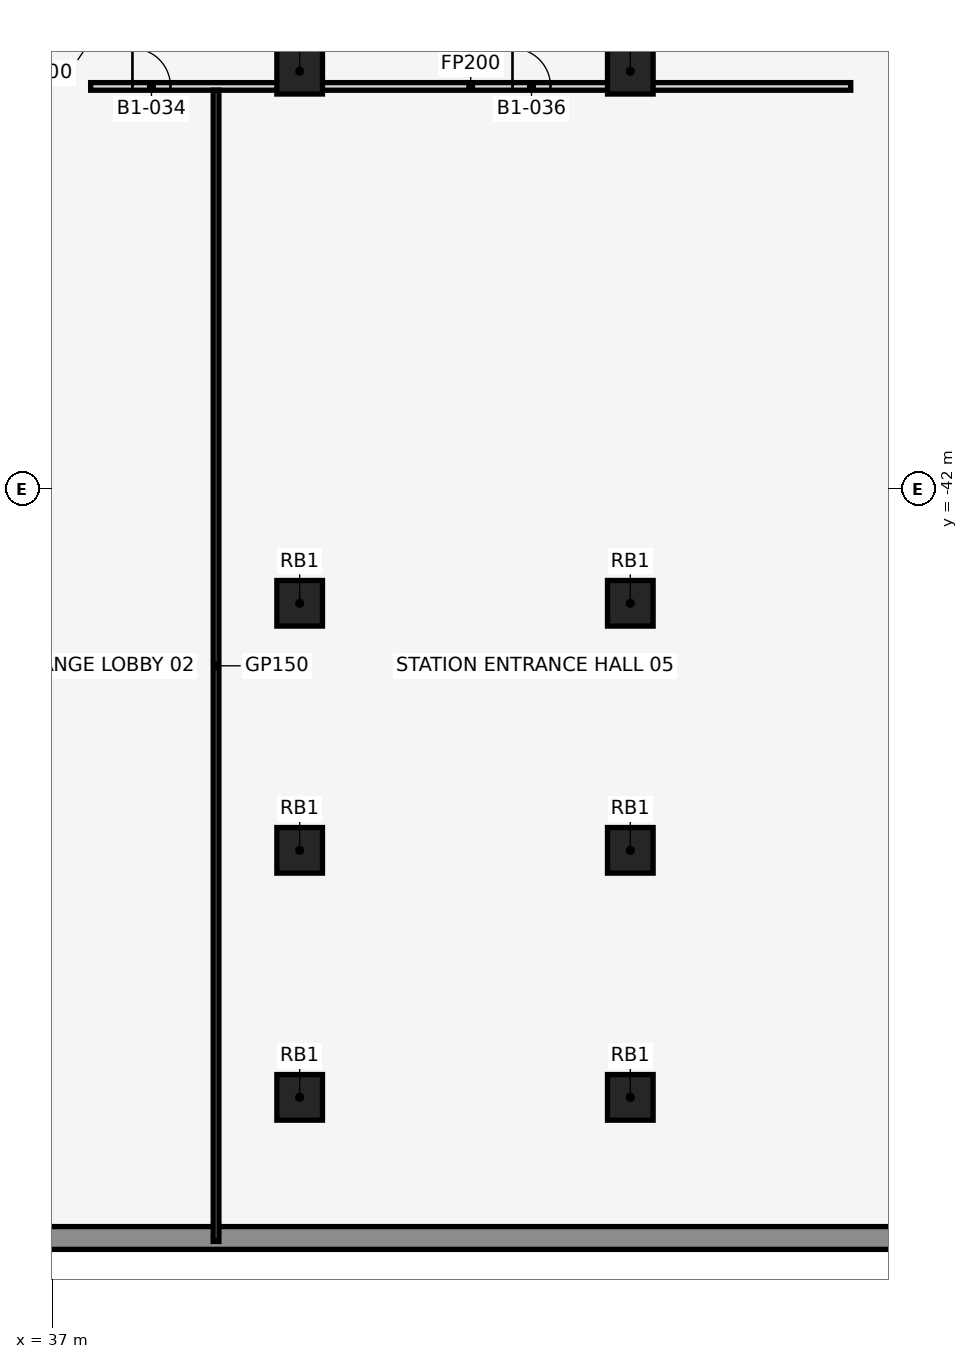
"""IFC4 building model, lengths in metres.
Left out: names, types, materials, properties, quantities, classifications, styles, units other than length and angle.
Written with IfcOpenShell. Run it as: python <this file> out.ifc"""

import sys

from ifc_helpers import new_model, si_unit, direction, frame, frame_2d, origin, origin_2d, place, context, subcontext, project, spatial, rectangle, extrude, element, fill, save


model = new_model("IFC4")
c1 = context("Model", 3, precision=1e-05, world=origin(), true_north=direction((0.0, 1.0)))
c2 = subcontext(c1, "Body", "Model", "MODEL_VIEW")
j1 = project(units=[si_unit("LENGTHUNIT", "METRE"), si_unit("PLANEANGLEUNIT", "RADIAN")], contexts=[c1])
p1 = place(None, origin())
s1 = spatial("IfcSite", under=j1, at=p1, CompositionType="ELEMENT")
p2 = place(p1, origin())
s2 = spatial("IfcBuilding", under=s1, at=p2, CompositionType="ELEMENT")
p3 = place(p2, frame((0.0, 0.0, -5.0)))
s3 = spatial("IfcBuildingStorey", under=s2, at=p3, CompositionType="ELEMENT", Elevation=-5.0)
for number, where, z_axis, x_axis in (
    (1, (43.5, -31.0, 0.0), (0.0, 0.0, 1.0), (1.0, 0.0, 0.0)),
    (2, (43.5, -45.0, 0.0), (0.0, 0.0, 1.0), (1.0, 0.0, 0.0)),
    (3, (43.5, -51.5, 0.0), (0.0, 0.0, 1.0), (1.0, 0.0, 0.0)),
    (4, (43.5, -58.0, 0.0), (0.0, 0.0, 1.0), (1.0, 0.0, 0.0)),
    (5, (52.2, -31.0, 0.0), (0.0, 0.0, 1.0), (1.0, 0.0, 0.0)),
    (6, (52.2, -45.0, 0.0), (0.0, 0.0, 1.0), (1.0, 0.0, 0.0)),
    (7, (52.2, -51.5, 0.0), (0.0, 0.0, 1.0), (1.0, 0.0, 0.0)),
    (8, (52.2, -58.0, 0.0), (0.0, 0.0, 1.0), (1.0, 0.0, 0.0)),
):
    element("IfcColumn", number, at=place(p3, frame(where, z_axis=z_axis, x_axis=x_axis)), inside=s3, PredefinedType="COLUMN", context=c2, shape_type="SweptSolid", body=[
        extrude(rectangle(XDim=1.2, YDim=1.2, at=origin_2d()), origin(), (0.0, 0.0, 1.0), 5.0),
    ])
p4 = place(p3, frame((-60.0, -61.7, 0.0), z_axis=(0.0, 0.0, 1.0), x_axis=(1.0, 0.0, 0.0)))
e9 = element("IfcWall", 9, at=p4, inside=s3, PredefinedType="SOLIDWALL", context=c2, shape_type="SweptSolid", body=[
    extrude(rectangle(XDim=120.0, YDim=0.6, at=frame_2d((60.0, 0.0))), origin(), (0.0, 0.0, 1.0), 5.0),
])
p5 = place(p3, frame((38.0, -31.4, 0.0), z_axis=(0.0, 0.0, 1.0), x_axis=(1.0, 0.0, 0.0)))
e10 = element("IfcWall", 10, at=p5, inside=s3, PredefinedType="PARTITIONING", context=c2, shape_type="SweptSolid", body=[
    extrude(rectangle(XDim=20.0, YDim=0.2, at=frame_2d((10.0, 0.0))), origin(), (0.0, 0.0, 1.0), 4.7),
])
p6 = place(p5, frame((1.1, 0.0, 0.0)))
e11 = element("IfcOpeningElement", 11, at=p6, cuts=e10, PredefinedType="OPENING", context=c2, shape_type="SweptSolid", body=[
    extrude(rectangle(XDim=1.0, YDim=2.1, at=frame_2d((0.5, 1.05))), frame((0.0, 0.112, 0.0), z_axis=(0.0, -1.0, 0.0), x_axis=(1.0, 0.0, 0.0)), (0.0, 0.0, 1.0), 0.224),
])
p7 = place(p5, frame((11.1, 0.0, 0.0)))
e12 = element("IfcOpeningElement", 12, at=p7, cuts=e10, PredefinedType="OPENING", context=c2, shape_type="SweptSolid", body=[
    extrude(rectangle(XDim=1.0, YDim=2.1, at=frame_2d((0.5, 1.05))), frame((0.0, 0.112, 0.0), z_axis=(0.0, -1.0, 0.0), x_axis=(1.0, 0.0, 0.0)), (0.0, 0.0, 1.0), 0.224),
])
p8 = place(p3, frame((41.3, -61.79, 0.0), z_axis=(0.0, 0.0, 1.0), x_axis=(0.0, 1.0, 0.0)))
e13 = element("IfcWall", 13, at=p8, inside=s3, PredefinedType="PARTITIONING", context=c2, shape_type="SweptSolid", body=[
    extrude(rectangle(XDim=30.29, YDim=0.15, at=frame_2d((15.145, 0.0))), origin(), (0.0, 0.0, 1.0), 4.7),
])
p9 = place(p6, frame((1.0, 0.0, 0.0), z_axis=(0.0, 0.0, 1.0), x_axis=(-1.0, 0.0, 0.0)))
e14 = element("IfcDoor", 14, at=p9, inside=s3, OperationType="SINGLE_SWING_LEFT", PredefinedType="DOOR", context=c2, shape_type="SweptSolid", body=[
    extrude(rectangle(XDim=1.0, YDim=2.1, at=frame_2d((0.5, 1.05))), frame((0.0, 0.025, 0.0), z_axis=(0.0, -1.0, 0.0), x_axis=(1.0, 0.0, 0.0)), (0.0, 0.0, 1.0), 0.05),
])
fill(e11, e14)
p10 = place(p7, frame((1.0, 0.0, 0.0), z_axis=(0.0, 0.0, 1.0), x_axis=(-1.0, 0.0, 0.0)))
e15 = element("IfcDoor", 15, at=p10, inside=s3, OperationType="SINGLE_SWING_RIGHT", PredefinedType="DOOR", context=c2, shape_type="SweptSolid", body=[
    extrude(rectangle(XDim=1.0, YDim=2.1, at=frame_2d((0.5, 1.05))), frame((0.0, 0.025, 0.0), z_axis=(0.0, -1.0, 0.0), x_axis=(1.0, 0.0, 0.0)), (0.0, 0.0, 1.0), 0.05),
])
fill(e12, e15)
save(model, sys.argv[1])
